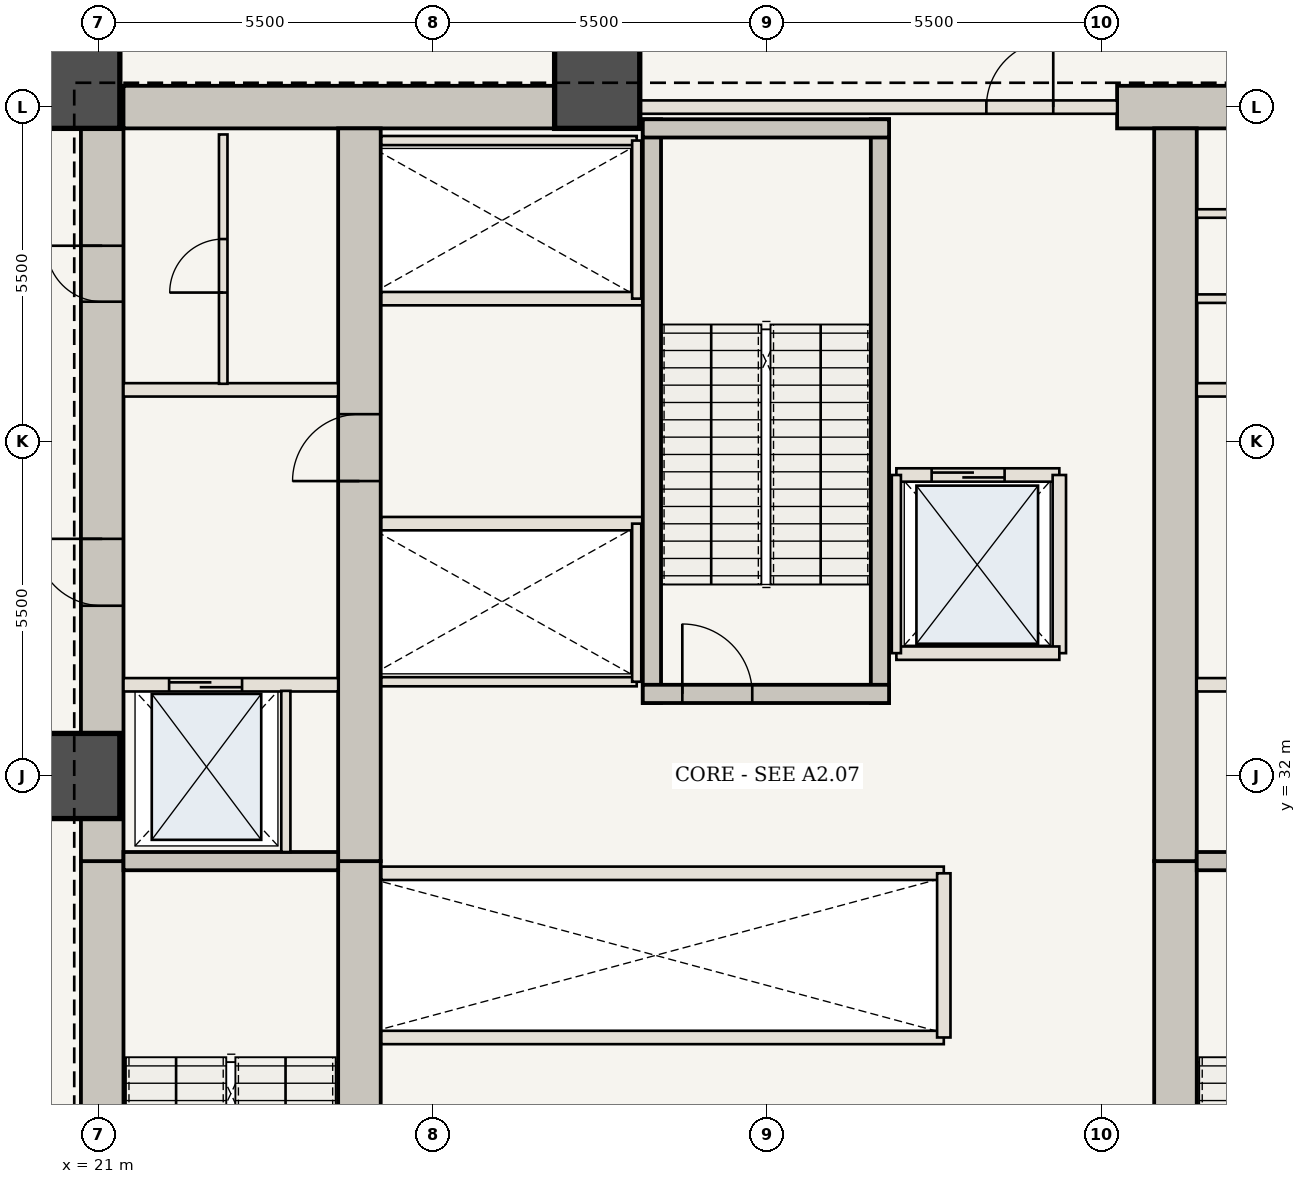
"""IFC4 building model, lengths in metres.
Left out: names, types, materials, properties, quantities, classifications, styles, units other than length and angle.
Written with IfcOpenShell. Run it as: python <this file> out.ifc"""

import sys

from ifc_helpers import new_model, si_unit, direction, frame, frame_2d, origin, origin_2d, place, context, subcontext, project, spatial, rectangle, extrude, element, fill, save


model = new_model("IFC4")
c1 = context("Model", 3, precision=1e-05, world=origin(), true_north=direction((0.0, 1.0)))
c2 = subcontext(c1, "Body", "Model", "MODEL_VIEW")
j1 = project(units=[si_unit("LENGTHUNIT", "METRE"), si_unit("PLANEANGLEUNIT", "RADIAN")], contexts=[c1])
p1 = place(None, origin())
s1 = spatial("IfcSite", under=j1, at=p1, CompositionType="ELEMENT")
p2 = place(p1, origin())
s2 = spatial("IfcBuilding", under=s1, at=p2, CompositionType="ELEMENT")
p3 = place(p2, frame((0.0, 0.0, 23.8)))
s3 = spatial("IfcBuildingStorey", under=s2, at=p3, CompositionType="ELEMENT", Elevation=23.8)
p4 = place(p3, frame((21.06, 20.6, 0.0), z_axis=(0.0, 0.0, 1.0), x_axis=(0.0, 1.0, 0.0)))
e1 = element("IfcWall", 1, at=p4, inside=s3, PredefinedType="SHEAR", context=c2, shape_type="SweptSolid", body=[
    extrude(rectangle(XDim=10.0, YDim=0.7, at=frame_2d((5.0, 0.0))), origin(), (0.0, 0.0, 1.0), 5.6),
])
p5 = place(p4, frame((1.15, 0.0, 0.0)))
e2 = element("IfcOpeningElement", 2, at=p5, cuts=e1, PredefinedType="OPENING", context=c2, shape_type="SweptSolid", body=[
    extrude(rectangle(XDim=1.15, YDim=2.15, at=frame_2d((0.575, 1.075))), frame((0.0, 0.36, 0.0), z_axis=(0.0, -1.0, 0.0), x_axis=(1.0, 0.0, 0.0)), (0.0, 0.0, 1.0), 0.72),
])
p6 = place(p3, frame((21.06, 30.6, 0.0), z_axis=(0.0, 0.0, 1.0), x_axis=(0.0, 1.0, 0.0)))
e3 = element("IfcWall", 3, at=p6, inside=s3, PredefinedType="SHEAR", context=c2, shape_type="SweptSolid", body=[
    extrude(rectangle(XDim=12.75, YDim=0.7, at=frame_2d((6.375, 0.0))), origin(), (0.0, 0.0, 1.0), 5.6),
])
p7 = place(p6, frame((4.2, 0.0, 0.0)))
e4 = element("IfcOpeningElement", 4, at=p7, cuts=e3, PredefinedType="OPENING", context=c2, shape_type="SweptSolid", body=[
    extrude(rectangle(XDim=1.1, YDim=2.15, at=frame_2d((0.55, 1.075))), frame((0.0, 0.36, 0.0), z_axis=(0.0, -1.0, 0.0), x_axis=(1.0, 0.0, 0.0)), (0.0, 0.0, 1.0), 0.72),
])
p8 = place(p6, frame((9.2, 0.0, 0.0)))
e5 = element("IfcOpeningElement", 5, at=p8, cuts=e3, PredefinedType="OPENING", context=c2, shape_type="SweptSolid", body=[
    extrude(rectangle(XDim=0.92, YDim=2.1, at=frame_2d((0.46, 1.05))), frame((0.0, 0.36, 0.0), z_axis=(0.0, -1.0, 0.0), x_axis=(1.0, 0.0, 0.0)), (0.0, 0.0, 1.0), 0.72),
])
p9 = place(p3, frame((21.41, 43.0, 0.0), z_axis=(0.0, 0.0, 1.0), x_axis=(1.0, 0.0, 0.0)))
e6 = element("IfcWall", 6, at=p9, inside=s3, PredefinedType="SHEAR", context=c2, shape_type="SweptSolid", body=[
    extrude(rectangle(XDim=8.24, YDim=0.7, at=frame_2d((4.12, 0.0))), origin(), (0.0, 0.0, 1.0), 5.6),
])
p10 = place(p3, frame((37.75, 43.0, 0.0), z_axis=(0.0, 0.0, 1.0), x_axis=(1.0, 0.0, 0.0)))
e7 = element("IfcWall", 7, at=p10, inside=s3, PredefinedType="SHEAR", context=c2, shape_type="SweptSolid", body=[
    extrude(rectangle(XDim=4.84, YDim=0.7, at=frame_2d((2.42, 0.0))), origin(), (0.0, 0.0, 1.0), 5.6),
])
p11 = place(p3, frame((25.29, 21.3, 0.0), z_axis=(0.0, 0.0, 1.0), x_axis=(0.0, 1.0, 0.0)))
e8 = element("IfcWall", 8, at=p11, inside=s3, PredefinedType="SHEAR", context=c2, shape_type="SweptSolid", body=[
    extrude(rectangle(XDim=9.3, YDim=0.7, at=frame_2d((4.65, 0.0))), origin(), (0.0, 0.0, 1.0), 5.6),
])
p12 = place(p3, frame((25.29, 30.6, 0.0), z_axis=(0.0, 0.0, 1.0), x_axis=(0.0, 1.0, 0.0)))
e9 = element("IfcWall", 9, at=p12, inside=s3, PredefinedType="SHEAR", context=c2, shape_type="SweptSolid", body=[
    extrude(rectangle(XDim=12.05, YDim=0.7, at=frame_2d((6.025, 0.0))), origin(), (0.0, 0.0, 1.0), 5.6),
])
p13 = place(p12, frame((6.25, 0.0, 0.0)))
e10 = element("IfcOpeningElement", 10, at=p13, cuts=e9, PredefinedType="OPENING", context=c2, shape_type="SweptSolid", body=[
    extrude(rectangle(XDim=1.1, YDim=2.15, at=frame_2d((0.55, 1.075))), frame((0.0, 0.36, 0.0), z_axis=(0.0, -1.0, 0.0), x_axis=(1.0, 0.0, 0.0)), (0.0, 0.0, 1.0), 0.72),
])
p14 = place(p3, frame((38.71, 21.3, 0.0), z_axis=(0.0, 0.0, 1.0), x_axis=(0.0, 1.0, 0.0)))
e11 = element("IfcWall", 11, at=p14, inside=s3, PredefinedType="SHEAR", context=c2, shape_type="SweptSolid", body=[
    extrude(rectangle(XDim=9.3, YDim=0.7, at=frame_2d((4.65, 0.0))), origin(), (0.0, 0.0, 1.0), 5.6),
])
p15 = place(p3, frame((38.71, 30.6, 0.0), z_axis=(0.0, 0.0, 1.0), x_axis=(0.0, 1.0, 0.0)))
e12 = element("IfcWall", 12, at=p15, inside=s3, PredefinedType="SHEAR", context=c2, shape_type="SweptSolid", body=[
    extrude(rectangle(XDim=12.05, YDim=0.7, at=frame_2d((6.025, 0.0))), origin(), (0.0, 0.0, 1.0), 5.6),
])
for number, where, z_axis, x_axis in (
    (13, (29.2, 43.35, 0.0), (0.0, 0.0, 1.0), (1.0, 0.0, 0.0)),
    (14, (20.65, 43.35, 0.0), (0.0, 0.0, 1.0), (1.0, 0.0, 0.0)),
    (15, (20.65, 32.0, 0.0), (0.0, 0.0, 1.0), (1.0, 0.0, 0.0)),
):
    element("IfcColumn", number, at=place(p3, frame(where, z_axis=z_axis, x_axis=x_axis)), inside=s3, PredefinedType="COLUMN", context=c2, shape_type="SweptSolid", body=[
        extrude(rectangle(XDim=1.4, YDim=1.4, at=origin_2d()), origin(), (0.0, 0.0, 1.0), 5.6),
    ])
for number, where, z_axis, x_axis in (
    (16, (21.41, 30.6, 0.0), (0.0, 0.0, 1.0), (1.0, 0.0, 0.0)),
    (17, (39.06, 30.6, 0.0), (0.0, 0.0, 1.0), (1.0, 0.0, 0.0)),
):
    element("IfcWall", number, at=place(p3, frame(where, z_axis=z_axis, x_axis=x_axis)), inside=s3, PredefinedType="SHEAR", context=c2, shape_type="SweptSolid", body=[
        extrude(rectangle(XDim=3.53, YDim=0.3, at=frame_2d((1.765, 0.0))), origin(), (0.0, 0.0, 1.0), 5.18),
    ])
p16 = place(p3, frame((21.41, 33.5, 0.0), z_axis=(0.0, 0.0, 1.0), x_axis=(1.0, 0.0, 0.0)))
e18 = element("IfcWall", 18, at=p16, inside=s3, PredefinedType="STANDARD", context=c2, shape_type="SweptSolid", body=[
    extrude(rectangle(XDim=3.53, YDim=0.22, at=frame_2d((1.765, 0.0))), origin(), (0.0, 0.0, 1.0), 5.18),
])
p17 = place(p16, frame((0.75, 0.0, 0.0)))
e19 = element("IfcOpeningElement", 19, at=p17, cuts=e18, PredefinedType="OPENING", context=c2, shape_type="SweptSolid", body=[
    extrude(rectangle(XDim=1.2, YDim=2.2, at=frame_2d((0.6, 1.1))), frame((0.0, 0.12, 0.0), z_axis=(0.0, -1.0, 0.0), x_axis=(1.0, 0.0, 0.0)), (0.0, 0.0, 1.0), 0.24),
])
p18 = place(p3, frame((24.08, 30.75, 0.0), z_axis=(0.0, 0.0, 1.0), x_axis=(0.0, 1.0, 0.0)))
e20 = element("IfcWall", 20, at=p18, inside=s3, PredefinedType="STANDARD", context=c2, shape_type="SweptSolid", body=[
    extrude(rectangle(XDim=2.65, YDim=0.15, at=frame_2d((1.325, 0.0))), origin(), (0.0, 0.0, 1.0), 5.18),
])
p19 = place(p3, frame((39.06, 33.5, 0.0), z_axis=(0.0, 0.0, 1.0), x_axis=(1.0, 0.0, 0.0)))
e21 = element("IfcWall", 21, at=p19, inside=s3, PredefinedType="STANDARD", context=c2, shape_type="SweptSolid", body=[
    extrude(rectangle(XDim=3.53, YDim=0.22, at=frame_2d((1.765, 0.0))), origin(), (0.0, 0.0, 1.0), 5.18),
])
p20 = place(p19, frame((1.55, 0.0, 0.0)))
e22 = element("IfcOpeningElement", 22, at=p20, cuts=e21, PredefinedType="OPENING", context=c2, shape_type="SweptSolid", body=[
    extrude(rectangle(XDim=1.2, YDim=2.2, at=frame_2d((0.6, 1.1))), frame((0.0, 0.12, 0.0), z_axis=(0.0, -1.0, 0.0), x_axis=(1.0, 0.0, 0.0)), (0.0, 0.0, 1.0), 0.24),
])
for number, where, z_axis, x_axis in (
    (23, (21.41, 38.35, 0.0), (0.0, 0.0, 1.0), (1.0, 0.0, 0.0)),
    (24, (39.06, 38.35, 0.0), (0.0, 0.0, 1.0), (1.0, 0.0, 0.0)),
):
    element("IfcWall", number, at=place(p3, frame(where, z_axis=z_axis, x_axis=x_axis)), inside=s3, PredefinedType="STANDARD", context=c2, shape_type="SweptSolid", body=[
        extrude(rectangle(XDim=3.53, YDim=0.22, at=frame_2d((1.765, 0.0))), origin(), (0.0, 0.0, 1.0), 5.18),
    ])
p21 = place(p3, frame((23.05, 38.45, 0.0), z_axis=(0.0, 0.0, 1.0), x_axis=(0.0, 1.0, 0.0)))
e25 = element("IfcWall", 25, at=p21, inside=s3, PredefinedType="STANDARD", context=c2, shape_type="SweptSolid", body=[
    extrude(rectangle(XDim=4.1, YDim=0.14, at=frame_2d((2.05, 0.0))), origin(), (0.0, 0.0, 1.0), 5.18),
])
p22 = place(p21, frame((1.5, 0.0, 0.0)))
e26 = element("IfcOpeningElement", 26, at=p22, cuts=e25, PredefinedType="OPENING", context=c2, shape_type="SweptSolid", body=[
    extrude(rectangle(XDim=0.88, YDim=2.1, at=frame_2d((0.44, 1.05))), frame((0.0, 0.08, 0.0), z_axis=(0.0, -1.0, 0.0), x_axis=(1.0, 0.0, 0.0)), (0.0, 0.0, 1.0), 0.16),
])
for number, where, z_axis, x_axis in (
    (27, (39.06, 39.85, 0.0), (0.0, 0.0, 1.0), (1.0, 0.0, 0.0)),
    (28, (39.06, 41.25, 0.0), (0.0, 0.0, 1.0), (1.0, 0.0, 0.0)),
):
    element("IfcWall", number, at=place(p3, frame(where, z_axis=z_axis, x_axis=x_axis)), inside=s3, PredefinedType="STANDARD", context=c2, shape_type="SweptSolid", body=[
        extrude(rectangle(XDim=3.53, YDim=0.14, at=frame_2d((1.765, 0.0))), origin(), (0.0, 0.0, 1.0), 5.18),
    ])
for number, where, z_axis, x_axis in (
    (29, (25.65, 27.7, 0.0), (0.0, 0.0, 1.0), (1.0, 0.0, 0.0)),
    (30, (25.65, 30.4, 0.0), (0.0, 0.0, 1.0), (1.0, 0.0, 0.0)),
):
    element("IfcWall", number, at=place(p3, frame(where, z_axis=z_axis, x_axis=x_axis)), inside=s3, PredefinedType="STANDARD", context=c2, shape_type="SweptSolid", body=[
        extrude(rectangle(XDim=9.25, YDim=0.22, at=frame_2d((4.625, 0.0))), origin(), (0.0, 0.0, 1.0), 5.18),
    ])
p23 = place(p3, frame((34.9, 27.7, 0.0), z_axis=(0.0, 0.0, 1.0), x_axis=(0.0, 1.0, 0.0)))
e31 = element("IfcWall", 31, at=p23, inside=s3, PredefinedType="STANDARD", context=c2, shape_type="SweptSolid", body=[
    extrude(rectangle(XDim=2.7, YDim=0.22, at=frame_2d((1.35, 0.0))), origin(), (0.0, 0.0, 1.0), 5.18),
])
p24 = place(p3, frame((25.65, 36.15, 0.0), z_axis=(0.0, 0.0, 1.0), x_axis=(1.0, 0.0, 0.0)))
e32 = element("IfcWall", 32, at=p24, inside=s3, PredefinedType="STANDARD", context=c2, shape_type="SweptSolid", body=[
    extrude(rectangle(XDim=4.3, YDim=0.22, at=frame_2d((2.15, 0.0))), origin(), (0.0, 0.0, 1.0), 5.18),
])
p25 = place(p3, frame((25.65, 33.55, 0.0), z_axis=(0.0, 0.0, 1.0), x_axis=(1.0, 0.0, 0.0)))
e33 = element("IfcWall", 33, at=p25, inside=s3, PredefinedType="STANDARD", context=c2, shape_type="SweptSolid", body=[
    extrude(rectangle(XDim=4.2, YDim=0.15, at=frame_2d((2.1, 0.0))), origin(), (0.0, 0.0, 1.0), 5.18),
])
p26 = place(p3, frame((29.85, 33.55, 0.0), z_axis=(0.0, 0.0, 1.0), x_axis=(0.0, 1.0, 0.0)))
e34 = element("IfcWall", 34, at=p26, inside=s3, PredefinedType="STANDARD", context=c2, shape_type="SweptSolid", body=[
    extrude(rectangle(XDim=2.6, YDim=0.15, at=frame_2d((1.3, 0.0))), origin(), (0.0, 0.0, 1.0), 5.18),
])
p27 = place(p3, frame((25.65, 39.85, 0.0), z_axis=(0.0, 0.0, 1.0), x_axis=(1.0, 0.0, 0.0)))
e35 = element("IfcWall", 35, at=p27, inside=s3, PredefinedType="STANDARD", context=c2, shape_type="SweptSolid", body=[
    extrude(rectangle(XDim=4.3, YDim=0.22, at=frame_2d((2.15, 0.0))), origin(), (0.0, 0.0, 1.0), 5.18),
])
p28 = place(p3, frame((25.65, 42.45, 0.0), z_axis=(0.0, 0.0, 1.0), x_axis=(1.0, 0.0, 0.0)))
e36 = element("IfcWall", 36, at=p28, inside=s3, PredefinedType="STANDARD", context=c2, shape_type="SweptSolid", body=[
    extrude(rectangle(XDim=4.2, YDim=0.15, at=frame_2d((2.1, 0.0))), origin(), (0.0, 0.0, 1.0), 5.18),
])
p29 = place(p3, frame((29.85, 39.85, 0.0), z_axis=(0.0, 0.0, 1.0), x_axis=(0.0, 1.0, 0.0)))
e37 = element("IfcWall", 37, at=p29, inside=s3, PredefinedType="STANDARD", context=c2, shape_type="SweptSolid", body=[
    extrude(rectangle(XDim=2.6, YDim=0.15, at=frame_2d((1.3, 0.0))), origin(), (0.0, 0.0, 1.0), 5.18),
])
for number, where, z_axis, x_axis in (
    (38, (30.1, 33.2, 0.0), (0.0, 0.0, 1.0), (0.0, 1.0, 0.0)),
    (39, (33.85, 33.2, 0.0), (0.0, 0.0, 1.0), (0.0, 1.0, 0.0)),
):
    element("IfcWall", number, at=place(p3, frame(where, z_axis=z_axis, x_axis=x_axis)), inside=s3, PredefinedType="SHEAR", context=c2, shape_type="SweptSolid", body=[
        extrude(rectangle(XDim=9.6, YDim=0.3, at=frame_2d((4.8, 0.0))), origin(), (0.0, 0.0, 1.0), 5.18),
    ])
p30 = place(p3, frame((29.95, 33.35, 0.0), z_axis=(0.0, 0.0, 1.0), x_axis=(1.0, 0.0, 0.0)))
e40 = element("IfcWall", 40, at=p30, inside=s3, PredefinedType="SHEAR", context=c2, shape_type="SweptSolid", body=[
    extrude(rectangle(XDim=4.05, YDim=0.3, at=frame_2d((2.025, 0.0))), origin(), (0.0, 0.0, 1.0), 5.18),
])
p31 = place(p30, frame((0.65, 0.0, 0.0)))
e41 = element("IfcOpeningElement", 41, at=p31, cuts=e40, PredefinedType="OPENING", context=c2, shape_type="SweptSolid", body=[
    extrude(rectangle(XDim=1.15, YDim=2.15, at=frame_2d((0.575, 1.075))), frame((0.0, 0.16, 0.0), z_axis=(0.0, -1.0, 0.0), x_axis=(1.0, 0.0, 0.0)), (0.0, 0.0, 1.0), 0.32),
])
p32 = place(p3, frame((29.95, 42.65, 0.0), z_axis=(0.0, 0.0, 1.0), x_axis=(1.0, 0.0, 0.0)))
e42 = element("IfcWall", 42, at=p32, inside=s3, PredefinedType="SHEAR", context=c2, shape_type="SweptSolid", body=[
    extrude(rectangle(XDim=4.05, YDim=0.3, at=frame_2d((2.025, 0.0))), origin(), (0.0, 0.0, 1.0), 5.18),
])
p33 = place(p3, frame((29.65, 43.0, 0.0), z_axis=(0.0, 0.0, 1.0), x_axis=(1.0, 0.0, 0.0)))
e43 = element("IfcWall", 43, at=p33, inside=s3, PredefinedType="STANDARD", context=c2, shape_type="SweptSolid", body=[
    extrude(rectangle(XDim=8.1, YDim=0.22, at=frame_2d((4.05, 0.0))), origin(), (0.0, 0.0, 1.0), 5.18),
])
p34 = place(p33, frame((5.95, 0.0, 0.0)))
e44 = element("IfcOpeningElement", 44, at=p34, cuts=e43, PredefinedType="OPENING", context=c2, shape_type="SweptSolid", body=[
    extrude(rectangle(XDim=1.1, YDim=2.15, at=frame_2d((0.55, 1.075))), frame((0.0, 0.12, 0.0), z_axis=(0.0, -1.0, 0.0), x_axis=(1.0, 0.0, 0.0)), (0.0, 0.0, 1.0), 0.24),
])
p35 = place(p3, frame((34.12, 36.95, 0.0), z_axis=(0.0, 0.0, 1.0), x_axis=(1.0, 0.0, 0.0)))
e45 = element("IfcWall", 45, at=p35, inside=s3, PredefinedType="STANDARD", context=c2, shape_type="SweptSolid", body=[
    extrude(rectangle(XDim=2.68, YDim=0.22, at=frame_2d((1.34, 0.0))), origin(), (0.0, 0.0, 1.0), 5.18),
])
p36 = place(p35, frame((0.58, 0.0, 0.0)))
e46 = element("IfcOpeningElement", 46, at=p36, cuts=e45, PredefinedType="OPENING", context=c2, shape_type="SweptSolid", body=[
    extrude(rectangle(XDim=1.2, YDim=2.2, at=frame_2d((0.6, 1.1))), frame((0.0, 0.12, 0.0), z_axis=(0.0, -1.0, 0.0), x_axis=(1.0, 0.0, 0.0)), (0.0, 0.0, 1.0), 0.24),
])
p37 = place(p3, frame((36.8, 34.02, 0.0), z_axis=(0.0, 0.0, 1.0), x_axis=(0.0, 1.0, 0.0)))
e47 = element("IfcWall", 47, at=p37, inside=s3, PredefinedType="STANDARD", context=c2, shape_type="SweptSolid", body=[
    extrude(rectangle(XDim=2.93, YDim=0.22, at=frame_2d((1.465, 0.0))), origin(), (0.0, 0.0, 1.0), 5.18),
])
p38 = place(p3, frame((34.12, 34.02, 0.0), z_axis=(0.0, 0.0, 1.0), x_axis=(1.0, 0.0, 0.0)))
e48 = element("IfcWall", 48, at=p38, inside=s3, PredefinedType="STANDARD", context=c2, shape_type="SweptSolid", body=[
    extrude(rectangle(XDim=2.68, YDim=0.22, at=frame_2d((1.34, 0.0))), origin(), (0.0, 0.0, 1.0), 5.18),
])
p39 = place(p3, frame((34.12, 34.02, 0.0), z_axis=(0.0, 0.0, 1.0), x_axis=(0.0, 1.0, 0.0)))
e49 = element("IfcWall", 49, at=p39, inside=s3, PredefinedType="STANDARD", context=c2, shape_type="SweptSolid", body=[
    extrude(rectangle(XDim=2.93, YDim=0.15, at=frame_2d((1.465, 0.0))), origin(), (0.0, 0.0, 1.0), 5.18),
])
p40 = place(p7, origin())
e50 = element("IfcDoor", 50, at=p40, inside=s3, OperationType="SINGLE_SWING_RIGHT", PredefinedType="DOOR", context=c2, shape_type="SweptSolid", body=[
    extrude(rectangle(XDim=1.1, YDim=2.15, at=frame_2d((0.55, 1.075))), frame((0.0, 0.025, 0.0), z_axis=(0.0, -1.0, 0.0), x_axis=(1.0, 0.0, 0.0)), (0.0, 0.0, 1.0), 0.05),
])
fill(e4, e50)
p41 = place(p13, origin())
e51 = element("IfcDoor", 51, at=p41, inside=s3, OperationType="SINGLE_SWING_LEFT", PredefinedType="DOOR", context=c2, shape_type="SweptSolid", body=[
    extrude(rectangle(XDim=1.1, YDim=2.15, at=frame_2d((0.55, 1.075))), frame((0.0, 0.025, 0.0), z_axis=(0.0, -1.0, 0.0), x_axis=(1.0, 0.0, 0.0)), (0.0, 0.0, 1.0), 0.05),
])
fill(e10, e51)
p42 = place(p8, origin())
e52 = element("IfcDoor", 52, at=p42, inside=s3, OperationType="SINGLE_SWING_RIGHT", PredefinedType="DOOR", context=c2, shape_type="SweptSolid", body=[
    extrude(rectangle(XDim=0.92, YDim=2.1, at=frame_2d((0.46, 1.05))), frame((0.0, 0.025, 0.0), z_axis=(0.0, -1.0, 0.0), x_axis=(1.0, 0.0, 0.0)), (0.0, 0.0, 1.0), 0.05),
])
fill(e5, e52)
p43 = place(p17, origin())
e53 = element("IfcDoor", 53, at=p43, inside=s3, OperationType="DOUBLE_DOOR_SLIDING", PredefinedType="DOOR", context=c2, shape_type="SweptSolid", body=[
    extrude(rectangle(XDim=1.2, YDim=2.2, at=frame_2d((0.6, 1.1))), frame((0.0, 0.025, 0.0), z_axis=(0.0, -1.0, 0.0), x_axis=(1.0, 0.0, 0.0)), (0.0, 0.0, 1.0), 0.05),
])
fill(e19, e53)
p44 = place(p22, origin())
e54 = element("IfcDoor", 54, at=p44, inside=s3, OperationType="SINGLE_SWING_LEFT", PredefinedType="DOOR", context=c2, shape_type="SweptSolid", body=[
    extrude(rectangle(XDim=0.88, YDim=2.1, at=frame_2d((0.44, 1.05))), frame((0.0, 0.025, 0.0), z_axis=(0.0, -1.0, 0.0), x_axis=(1.0, 0.0, 0.0)), (0.0, 0.0, 1.0), 0.05),
])
fill(e26, e54)
p45 = place(p31, origin())
e55 = element("IfcDoor", 55, at=p45, inside=s3, OperationType="SINGLE_SWING_LEFT", PredefinedType="DOOR", context=c2, shape_type="SweptSolid", body=[
    extrude(rectangle(XDim=1.15, YDim=2.15, at=frame_2d((0.575, 1.075))), frame((0.0, 0.025, 0.0), z_axis=(0.0, -1.0, 0.0), x_axis=(1.0, 0.0, 0.0)), (0.0, 0.0, 1.0), 0.05),
])
fill(e41, e55)
p46 = place(p34, origin())
e56 = element("IfcDoor", 56, at=p46, inside=s3, OperationType="SINGLE_SWING_RIGHT", PredefinedType="DOOR", context=c2, shape_type="SweptSolid", body=[
    extrude(rectangle(XDim=1.1, YDim=2.15, at=frame_2d((0.55, 1.075))), frame((0.0, 0.025, 0.0), z_axis=(0.0, -1.0, 0.0), x_axis=(1.0, 0.0, 0.0)), (0.0, 0.0, 1.0), 0.05),
])
fill(e44, e56)
p47 = place(p36, origin())
e57 = element("IfcDoor", 57, at=p47, inside=s3, OperationType="DOUBLE_DOOR_SLIDING", PredefinedType="DOOR", context=c2, shape_type="SweptSolid", body=[
    extrude(rectangle(XDim=1.2, YDim=2.2, at=frame_2d((0.6, 1.1))), frame((0.0, 0.025, 0.0), z_axis=(0.0, -1.0, 0.0), x_axis=(1.0, 0.0, 0.0)), (0.0, 0.0, 1.0), 0.05),
])
fill(e46, e57)
save(model, sys.argv[1])
